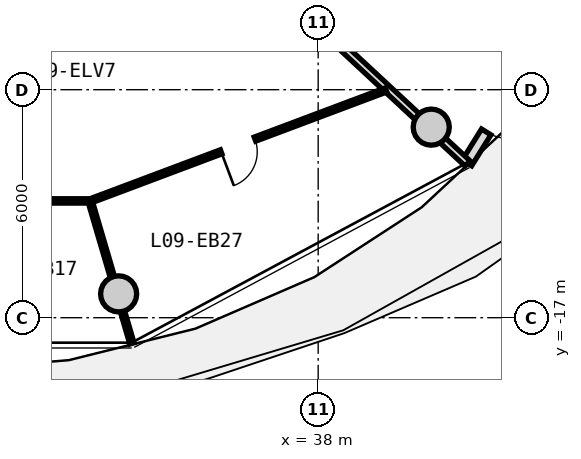
"""IFC4 building model, lengths in metres.
Left out: names, types, materials, properties, quantities, classifications, styles, units other than length and angle.
Written with IfcOpenShell. Run it as: python <this file> out.ifc"""

import sys

from ifc_helpers import new_model, si_unit, direction, frame, frame_2d, origin, origin_2d, place, context, subcontext, project, spatial, rectangle, circle, extrude, source, transform, mapped, element, fill, save


model = new_model("IFC4")
c1 = context("Model", 3, precision=1e-05, world=origin(), true_north=direction((0.0, 1.0)))
c2 = subcontext(c1, "Body", "Model", "MODEL_VIEW")
j1 = project(units=[si_unit("LENGTHUNIT", "METRE"), si_unit("PLANEANGLEUNIT", "RADIAN")], contexts=[c1])
p1 = place(None, origin())
s1 = spatial("IfcSite", under=j1, at=p1, CompositionType="ELEMENT")
p2 = place(p1, origin())
s2 = spatial("IfcBuilding", under=s1, at=p2, CompositionType="ELEMENT")
p3 = place(p2, frame((0.0, 0.0, 33.8)))
s3 = spatial("IfcBuildingStorey", under=s2, at=p3, CompositionType="ELEMENT", Elevation=33.8)
m1 = source(origin(), c2, "Body", "SweptSolid", [
    extrude(circle(Radius=0.475, at=origin_2d()), origin(), (0.0, 0.0, 1.0), 3.05),
])
for number, where, z_axis, x_axis in (
    (1, (32.749, -16.373, 0.0), (0.0, 0.0, 1.0), (1.0, 0.0, 0.0)),
    (2, (40.975, -11.985, 0.0), (0.0, 0.0, 1.0), (1.0, 0.0, 0.0)),
):
    element("IfcColumn", number, at=place(p3, frame(where, z_axis=z_axis, x_axis=x_axis)), inside=s3, PredefinedType="COLUMN", context=c2, shape_type="MappedRepresentation", body=[
        mapped(m1, transform((0.0, 0.0, 0.0), x_axis=(1.0, 0.0, 0.0), y_axis=(0.0, 1.0, 0.0), z_axis=(0.0, 0.0, 1.0), scale=1.0)),
    ])
m2 = source(origin(), c2, "Body", "SweptSolid", [
    extrude(rectangle(XDim=9.649, YDim=0.29, at=frame_2d((4.824, 0.0))), origin(), (0.0, 0.0, 1.0), 2.79),
])
p4 = place(p3, frame((47.01, -4.731, 0.0), z_axis=(0.0, 0.0, 1.0), x_axis=(-0.527909458386, -0.849300655684, 0.0)))
e3 = element("IfcWall", 3, at=p4, inside=s3, PredefinedType="SOLIDWALL", context=c2, shape_type="MappedRepresentation", body=[
    mapped(m2, transform((0.0, 0.0, 0.0), x_axis=(1.0, 0.0, 0.0), y_axis=(0.0, 1.0, 0.0), z_axis=(0.0, 0.0, 1.0), scale=1.0)),
])
p5 = place(p4, frame((7.54, 0.0, 0.0)))
e4 = element("IfcOpeningElement", 4, at=p5, cuts=e3, PredefinedType="OPENING", context=c2, shape_type="SweptSolid", body=[
    extrude(rectangle(XDim=1.15, YDim=2.25, at=frame_2d((0.575, 1.125))), frame((0.0, 0.155, 0.0), z_axis=(0.0, -1.0, 0.0), x_axis=(1.0, 0.0, 0.0)), (0.0, 0.0, 1.0), 0.31),
])
p6 = place(p4, frame((0.85, 0.0, 0.85)))
e5 = element("IfcOpeningElement", 5, at=p6, cuts=e3, PredefinedType="OPENING", context=c2, shape_type="SweptSolid", body=[
    extrude(rectangle(XDim=1.2, YDim=1.5, at=frame_2d((0.6, 0.75))), frame((0.0, 0.155, 0.0), z_axis=(0.0, -1.0, 0.0), x_axis=(1.0, 0.0, 0.0)), (0.0, 0.0, 1.0), 0.31),
])
m3 = source(origin(), c2, "Body", "SweptSolid", [
    extrude(rectangle(XDim=7.435, YDim=0.19, at=frame_2d((3.717, 0.0))), origin(), (0.0, 0.0, 1.0), 2.225),
])
p7 = place(p3, frame((36.483, -7.88, 0.0), z_axis=(0.0, 0.0, 1.0), x_axis=(0.732651956848, -0.680603489652, 0.0)))
e6 = element("IfcWall", 6, at=p7, inside=s3, PredefinedType="PARTITIONING", context=c2, shape_type="MappedRepresentation", body=[
    mapped(m3, transform((0.0, 0.0, 0.0), x_axis=(1.0, 0.0, 0.0), y_axis=(0.0, 1.0, 0.0), z_axis=(0.0, 0.0, 1.0), scale=1.0)),
])
m4 = source(origin(), c2, "Body", "SweptSolid", [
    extrude(rectangle(XDim=7.993, YDim=0.115, at=frame_2d((3.996, 0.0))), origin(), (0.0, 0.0, 1.0), 2.775),
])
p8 = place(p3, frame((24.004, -13.927, 0.0), z_axis=(0.0, 0.0, 1.0), x_axis=(1.0, 0.0, 0.0)))
e7 = element("IfcWall", 7, at=p8, inside=s3, PredefinedType="PARTITIONING", context=c2, shape_type="MappedRepresentation", body=[
    mapped(m4, transform((0.0, 0.0, 0.0), x_axis=(1.0, 0.0, 0.0), y_axis=(0.0, 1.0, 0.0), z_axis=(0.0, 0.0, 1.0), scale=1.0)),
])
p9 = place(p8, frame((3.521, 0.0, 0.0)))
e8 = element("IfcOpeningElement", 8, at=p9, cuts=e7, PredefinedType="OPENING", context=c2, shape_type="SweptSolid", body=[
    extrude(rectangle(XDim=0.95, YDim=2.1, at=frame_2d((0.475, 1.05))), frame((0.0, 0.067, 0.0), z_axis=(0.0, -1.0, 0.0), x_axis=(1.0, 0.0, 0.0)), (0.0, 0.0, 1.0), 0.135),
])
m5 = source(origin(), c2, "Body", "SweptSolid", [
    extrude(rectangle(XDim=8.32, YDim=0.115, at=frame_2d((4.16, 0.0))), origin(), (0.0, 0.0, 1.0), 2.775),
])
p10 = place(p3, frame((31.997, -13.93, 0.0), z_axis=(0.0, 0.0, 1.0), x_axis=(0.936180763098, 0.351518959382, 0.0)))
e9 = element("IfcWall", 9, at=p10, inside=s3, PredefinedType="PARTITIONING", context=c2, shape_type="MappedRepresentation", body=[
    mapped(m5, transform((0.0, 0.0, 0.0), x_axis=(1.0, 0.0, 0.0), y_axis=(0.0, 1.0, 0.0), z_axis=(0.0, 0.0, 1.0), scale=1.0)),
])
p11 = place(p10, frame((3.685, 0.0, 0.0)))
e10 = element("IfcOpeningElement", 10, at=p11, cuts=e9, PredefinedType="OPENING", context=c2, shape_type="SweptSolid", body=[
    extrude(rectangle(XDim=0.95, YDim=2.1, at=frame_2d((0.475, 1.05))), frame((0.0, 0.067, 0.0), z_axis=(0.0, -1.0, 0.0), x_axis=(1.0, 0.0, 0.0)), (0.0, 0.0, 1.0), 0.135),
])
m6 = source(origin(), c2, "Body", "SweptSolid", [
    extrude(rectangle(XDim=3.905, YDim=0.115, at=frame_2d((1.952, 0.0))), origin(), (0.0, 0.0, 1.0), 2.225),
])
p12 = place(p3, frame((31.997, -13.93, 0.0), z_axis=(0.0, 0.0, 1.0), x_axis=(0.282037692958, -0.959403324859, 0.0)))
e11 = element("IfcWall", 11, at=p12, inside=s3, PredefinedType="PARTITIONING", context=c2, shape_type="MappedRepresentation", body=[
    mapped(m6, transform((0.0, 0.0, 0.0), x_axis=(1.0, 0.0, 0.0), y_axis=(0.0, 1.0, 0.0), z_axis=(0.0, 0.0, 1.0), scale=1.0)),
])
m7 = source(origin(), c2, "Body", "SweptSolid", [
    extrude(rectangle(XDim=1.15, YDim=2.25, at=frame_2d((0.575, 1.125))), frame((0.0, 0.025, 0.0), z_axis=(0.0, -1.0, 0.0), x_axis=(1.0, 0.0, 0.0)), (0.0, 0.0, 1.0), 0.05),
])
p13 = place(p5, origin())
e12 = element("IfcDoor", 12, at=p13, inside=s3, OperationType="SINGLE_SWING_LEFT", PredefinedType="DOOR", context=c2, shape_type="MappedRepresentation", body=[
    mapped(m7, transform((0.0, 0.0, 0.0), x_axis=(1.0, 0.0, 0.0), y_axis=(0.0, 1.0, 0.0), z_axis=(0.0, 0.0, 1.0), scale=1.0)),
])
fill(e4, e12)
m8 = source(origin(), c2, "Body", "SweptSolid", [
    extrude(rectangle(XDim=0.95, YDim=2.1, at=frame_2d((0.475, 1.05))), frame((0.0, 0.025, 0.0), z_axis=(0.0, -1.0, 0.0), x_axis=(1.0, 0.0, 0.0)), (0.0, 0.0, 1.0), 0.05),
])
p14 = place(p11, frame((0.95, 0.0, 0.0), z_axis=(0.0, 0.0, 1.0), x_axis=(-1.0, 0.0, 0.0)))
e13 = element("IfcDoor", 13, at=p14, inside=s3, OperationType="SINGLE_SWING_RIGHT", PredefinedType="DOOR", context=c2, shape_type="MappedRepresentation", body=[
    mapped(m8, transform((0.0, 0.0, 0.0), x_axis=(1.0, 0.0, 0.0), y_axis=(0.0, 1.0, 0.0), z_axis=(0.0, 0.0, 1.0), scale=1.0)),
])
fill(e10, e13)
save(model, sys.argv[1])
